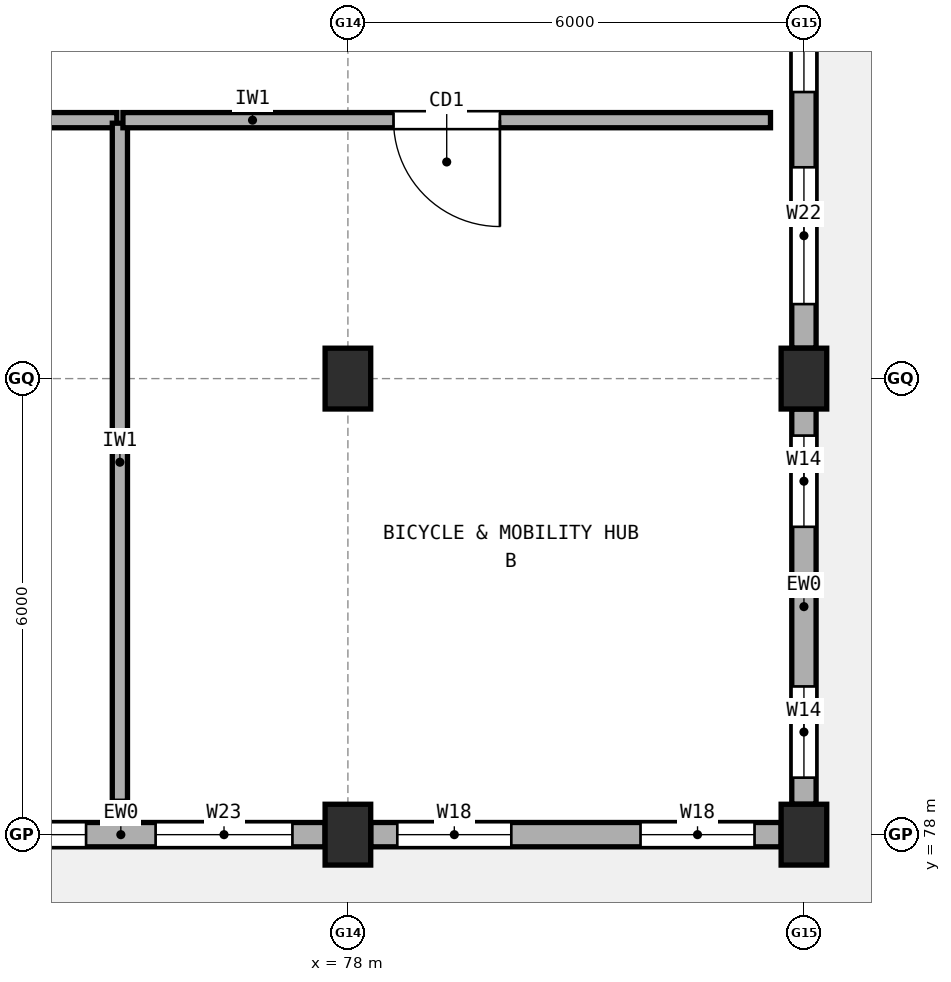
"""IFC4 building model, lengths in metres.
Left out: names, types, materials, properties, quantities, classifications, styles, units other than length and angle.
Written with IfcOpenShell. Run it as: python <this file> out.ifc"""

import sys

from ifc_helpers import new_model, si_unit, direction, frame, frame_2d, origin, origin_2d, place, context, subcontext, project, spatial, rectangle, extrude, element, fill, save


model = new_model("IFC4")
c1 = context("Model", 3, precision=1e-05, world=origin(), true_north=direction((0.0, 1.0)))
c2 = subcontext(c1, "Body", "Model", "MODEL_VIEW")
j1 = project(units=[si_unit("LENGTHUNIT", "METRE"), si_unit("PLANEANGLEUNIT", "RADIAN")], contexts=[c1])
p1 = place(None, origin())
s1 = spatial("IfcSite", under=j1, at=p1, CompositionType="ELEMENT")
p2 = place(p1, origin())
s2 = spatial("IfcBuilding", under=s1, at=p2, CompositionType="ELEMENT")
p3 = place(p2, origin())
s3 = spatial("IfcBuildingStorey", under=s2, at=p3, CompositionType="ELEMENT", Elevation=0.0)
for number, where, z_axis, x_axis in (
    (1, (78.0, 78.0, 0.0), (0.0, 0.0, 1.0), (1.0, 0.0, 0.0)),
    (2, (78.0, 84.0, 0.0), (0.0, 0.0, 1.0), (1.0, 0.0, 0.0)),
    (3, (84.0, 78.0, 0.0), (0.0, 0.0, 1.0), (1.0, 0.0, 0.0)),
    (4, (84.0, 84.0, 0.0), (0.0, 0.0, 1.0), (1.0, 0.0, 0.0)),
):
    element("IfcColumn", number, at=place(p3, frame(where, z_axis=z_axis, x_axis=x_axis)), inside=s3, PredefinedType="COLUMN", context=c2, shape_type="SweptSolid", body=[
        extrude(rectangle(XDim=0.6, YDim=0.8, at=origin_2d()), origin(), (0.0, 0.0, 1.0), 4.23),
    ])
p4 = place(p3, frame((72.35, 78.0, 0.0), z_axis=(0.0, 0.0, 1.0), x_axis=(1.0, 0.0, 0.0)))
e5 = element("IfcWall", 5, at=p4, inside=s3, PredefinedType="STANDARD", context=c2, shape_type="SweptSolid", body=[
    extrude(rectangle(XDim=5.35, YDim=0.32, at=frame_2d((2.675, 0.0))), origin(), (0.0, 0.0, 1.0), 3.112),
])
p5 = place(p4, frame((0.405, 0.0, 0.9)))
e6 = element("IfcOpeningElement", 6, at=p5, cuts=e5, PredefinedType="OPENING", context=c2, shape_type="SweptSolid", body=[
    extrude(rectangle(XDim=1.8, YDim=1.45, at=frame_2d((0.9, 0.725))), frame((0.0, 0.17, 0.0), z_axis=(0.0, -1.0, 0.0), x_axis=(1.0, 0.0, 0.0)), (0.0, 0.0, 1.0), 0.34),
])
p6 = place(p4, frame((3.12, 0.0, 0.9)))
e7 = element("IfcOpeningElement", 7, at=p6, cuts=e5, PredefinedType="OPENING", context=c2, shape_type="SweptSolid", body=[
    extrude(rectangle(XDim=1.8, YDim=1.6, at=frame_2d((0.9, 0.8))), frame((0.0, 0.17, 0.0), z_axis=(0.0, -1.0, 0.0), x_axis=(1.0, 0.0, 0.0)), (0.0, 0.0, 1.0), 0.34),
])
p7 = place(p3, frame((78.3, 78.0, 0.0), z_axis=(0.0, 0.0, 1.0), x_axis=(1.0, 0.0, 0.0)))
e8 = element("IfcWall", 8, at=p7, inside=s3, PredefinedType="STANDARD", context=c2, shape_type="SweptSolid", body=[
    extrude(rectangle(XDim=5.4, YDim=0.32, at=frame_2d((2.7, 0.0))), origin(), (0.0, 0.0, 1.0), 3.112),
])
p8 = place(p7, frame((0.35, 0.0, 0.9)))
e9 = element("IfcOpeningElement", 9, at=p8, cuts=e8, PredefinedType="OPENING", context=c2, shape_type="SweptSolid", body=[
    extrude(rectangle(XDim=1.5, YDim=1.4, at=frame_2d((0.75, 0.7))), frame((0.0, 0.17, 0.0), z_axis=(0.0, -1.0, 0.0), x_axis=(1.0, 0.0, 0.0)), (0.0, 0.0, 1.0), 0.34),
])
p9 = place(p7, frame((3.55, 0.0, 0.9)))
e10 = element("IfcOpeningElement", 10, at=p9, cuts=e8, PredefinedType="OPENING", context=c2, shape_type="SweptSolid", body=[
    extrude(rectangle(XDim=1.5, YDim=1.4, at=frame_2d((0.75, 0.7))), frame((0.0, 0.17, 0.0), z_axis=(0.0, -1.0, 0.0), x_axis=(1.0, 0.0, 0.0)), (0.0, 0.0, 1.0), 0.34),
])
p10 = place(p3, frame((84.0, 78.4, 0.0), z_axis=(0.0, 0.0, 1.0), x_axis=(0.0, 1.0, 0.0)))
e11 = element("IfcWall", 11, at=p10, inside=s3, PredefinedType="STANDARD", context=c2, shape_type="SweptSolid", body=[
    extrude(rectangle(XDim=5.2, YDim=0.32, at=frame_2d((2.6, 0.0))), origin(), (0.0, 0.0, 1.0), 3.712),
])
p11 = place(p10, frame((0.35, 0.0, 0.9)))
e12 = element("IfcOpeningElement", 12, at=p11, cuts=e11, PredefinedType="OPENING", context=c2, shape_type="SweptSolid", body=[
    extrude(rectangle(XDim=1.2, YDim=1.5, at=frame_2d((0.6, 0.75))), frame((0.0, 0.17, 0.0), z_axis=(0.0, -1.0, 0.0), x_axis=(1.0, 0.0, 0.0)), (0.0, 0.0, 1.0), 0.34),
])
p12 = place(p10, frame((3.65, 0.0, 0.9)))
e13 = element("IfcOpeningElement", 13, at=p12, cuts=e11, PredefinedType="OPENING", context=c2, shape_type="SweptSolid", body=[
    extrude(rectangle(XDim=1.2, YDim=1.5, at=frame_2d((0.6, 0.75))), frame((0.0, 0.17, 0.0), z_axis=(0.0, -1.0, 0.0), x_axis=(1.0, 0.0, 0.0)), (0.0, 0.0, 1.0), 0.34),
])
p13 = place(p3, frame((84.0, 84.4, 0.0), z_axis=(0.0, 0.0, 1.0), x_axis=(0.0, 1.0, 0.0)))
e14 = element("IfcWall", 14, at=p13, inside=s3, PredefinedType="STANDARD", context=c2, shape_type="SweptSolid", body=[
    extrude(rectangle(XDim=5.2, YDim=0.32, at=frame_2d((2.6, 0.0))), origin(), (0.0, 0.0, 1.0), 3.712),
])
p14 = place(p13, frame((0.58, 0.0, 0.9)))
e15 = element("IfcOpeningElement", 15, at=p14, cuts=e14, PredefinedType="OPENING", context=c2, shape_type="SweptSolid", body=[
    extrude(rectangle(XDim=1.8, YDim=1.45, at=frame_2d((0.9, 0.725))), frame((0.0, 0.17, 0.0), z_axis=(0.0, -1.0, 0.0), x_axis=(1.0, 0.0, 0.0)), (0.0, 0.0, 1.0), 0.34),
])
p15 = place(p13, frame((3.37, 0.0, 0.9)))
e16 = element("IfcOpeningElement", 16, at=p15, cuts=e14, PredefinedType="OPENING", context=c2, shape_type="SweptSolid", body=[
    extrude(rectangle(XDim=1.5, YDim=1.4, at=frame_2d((0.75, 0.7))), frame((0.0, 0.17, 0.0), z_axis=(0.0, -1.0, 0.0), x_axis=(1.0, 0.0, 0.0)), (0.0, 0.0, 1.0), 0.34),
])
p16 = place(p3, frame((57.04, 87.4, 0.0), z_axis=(0.0, 0.0, 1.0), x_axis=(1.0, 0.0, 0.0)))
e17 = element("IfcWall", 17, at=p16, inside=s3, PredefinedType="SOLIDWALL", context=c2, shape_type="SweptSolid", body=[
    extrude(rectangle(XDim=17.92, YDim=0.2, at=frame_2d((8.96, 0.0))), origin(), (0.0, 0.0, 1.0), 3.612),
])
p17 = place(p16, frame((8.31, 0.0, 0.0)))
e18 = element("IfcOpeningElement", 18, at=p17, cuts=e17, PredefinedType="OPENING", context=c2, shape_type="SweptSolid", body=[
    extrude(rectangle(XDim=1.3, YDim=2.15, at=frame_2d((0.65, 1.075))), frame((0.0, 0.11, 0.0), z_axis=(0.0, -1.0, 0.0), x_axis=(1.0, 0.0, 0.0)), (0.0, 0.0, 1.0), 0.22),
])
p18 = place(p3, frame((75.0, 78.44, 0.0), z_axis=(0.0, 0.0, 1.0), x_axis=(0.0, 1.0, 0.0)))
e19 = element("IfcWall", 19, at=p18, inside=s3, PredefinedType="SOLIDWALL", context=c2, shape_type="SweptSolid", body=[
    extrude(rectangle(XDim=8.92, YDim=0.2, at=frame_2d((4.46, 0.0))), origin(), (0.0, 0.0, 1.0), 3.562),
])
p19 = place(p3, frame((75.04, 87.4, 0.0), z_axis=(0.0, 0.0, 1.0), x_axis=(1.0, 0.0, 0.0)))
e20 = element("IfcWall", 20, at=p19, inside=s3, PredefinedType="SOLIDWALL", context=c2, shape_type="SweptSolid", body=[
    extrude(rectangle(XDim=8.52, YDim=0.2, at=frame_2d((4.26, 0.0))), origin(), (0.0, 0.0, 1.0), 3.712),
])
p20 = place(p19, frame((3.56, 0.0, 0.0)))
e21 = element("IfcOpeningElement", 21, at=p20, cuts=e20, PredefinedType="OPENING", context=c2, shape_type="SweptSolid", body=[
    extrude(rectangle(XDim=1.4, YDim=2.15, at=frame_2d((0.7, 1.075))), frame((0.0, 0.11, 0.0), z_axis=(0.0, -1.0, 0.0), x_axis=(1.0, 0.0, 0.0)), (0.0, 0.0, 1.0), 0.22),
])
p21 = place(p5, origin())
e22 = element("IfcWindow", 22, at=p21, inside=s3, PartitioningType="SINGLE_PANEL", PredefinedType="WINDOW", context=c2, shape_type="SweptSolid", body=[
    extrude(rectangle(XDim=1.8, YDim=1.45, at=frame_2d((0.9, 0.725))), frame((0.0, 0.03, 0.0), z_axis=(0.0, -1.0, 0.0), x_axis=(1.0, 0.0, 0.0)), (0.0, 0.0, 1.0), 0.06),
])
fill(e6, e22)
p22 = place(p6, origin())
e23 = element("IfcWindow", 23, at=p22, inside=s3, PartitioningType="SINGLE_PANEL", PredefinedType="WINDOW", context=c2, shape_type="SweptSolid", body=[
    extrude(rectangle(XDim=1.8, YDim=1.6, at=frame_2d((0.9, 0.8))), frame((0.0, 0.03, 0.0), z_axis=(0.0, -1.0, 0.0), x_axis=(1.0, 0.0, 0.0)), (0.0, 0.0, 1.0), 0.06),
])
fill(e7, e23)
p23 = place(p8, origin())
e24 = element("IfcWindow", 24, at=p23, inside=s3, PartitioningType="SINGLE_PANEL", PredefinedType="WINDOW", context=c2, shape_type="SweptSolid", body=[
    extrude(rectangle(XDim=1.5, YDim=1.4, at=frame_2d((0.75, 0.7))), frame((0.0, 0.03, 0.0), z_axis=(0.0, -1.0, 0.0), x_axis=(1.0, 0.0, 0.0)), (0.0, 0.0, 1.0), 0.06),
])
fill(e9, e24)
p24 = place(p9, origin())
e25 = element("IfcWindow", 25, at=p24, inside=s3, PartitioningType="SINGLE_PANEL", PredefinedType="WINDOW", context=c2, shape_type="SweptSolid", body=[
    extrude(rectangle(XDim=1.5, YDim=1.4, at=frame_2d((0.75, 0.7))), frame((0.0, 0.03, 0.0), z_axis=(0.0, -1.0, 0.0), x_axis=(1.0, 0.0, 0.0)), (0.0, 0.0, 1.0), 0.06),
])
fill(e10, e25)
p25 = place(p11, origin())
e26 = element("IfcWindow", 26, at=p25, inside=s3, PartitioningType="SINGLE_PANEL", PredefinedType="WINDOW", context=c2, shape_type="SweptSolid", body=[
    extrude(rectangle(XDim=1.2, YDim=1.5, at=frame_2d((0.6, 0.75))), frame((0.0, 0.03, 0.0), z_axis=(0.0, -1.0, 0.0), x_axis=(1.0, 0.0, 0.0)), (0.0, 0.0, 1.0), 0.06),
])
fill(e12, e26)
p26 = place(p12, origin())
e27 = element("IfcWindow", 27, at=p26, inside=s3, PartitioningType="SINGLE_PANEL", PredefinedType="WINDOW", context=c2, shape_type="SweptSolid", body=[
    extrude(rectangle(XDim=1.2, YDim=1.5, at=frame_2d((0.6, 0.75))), frame((0.0, 0.03, 0.0), z_axis=(0.0, -1.0, 0.0), x_axis=(1.0, 0.0, 0.0)), (0.0, 0.0, 1.0), 0.06),
])
fill(e13, e27)
p27 = place(p14, origin())
e28 = element("IfcWindow", 28, at=p27, inside=s3, PartitioningType="SINGLE_PANEL", PredefinedType="WINDOW", context=c2, shape_type="SweptSolid", body=[
    extrude(rectangle(XDim=1.8, YDim=1.45, at=frame_2d((0.9, 0.725))), frame((0.0, 0.03, 0.0), z_axis=(0.0, -1.0, 0.0), x_axis=(1.0, 0.0, 0.0)), (0.0, 0.0, 1.0), 0.06),
])
fill(e15, e28)
p28 = place(p15, origin())
e29 = element("IfcWindow", 29, at=p28, inside=s3, PartitioningType="SINGLE_PANEL", PredefinedType="WINDOW", context=c2, shape_type="SweptSolid", body=[
    extrude(rectangle(XDim=1.5, YDim=1.4, at=frame_2d((0.75, 0.7))), frame((0.0, 0.03, 0.0), z_axis=(0.0, -1.0, 0.0), x_axis=(1.0, 0.0, 0.0)), (0.0, 0.0, 1.0), 0.06),
])
fill(e16, e29)
p29 = place(p20, origin())
e30 = element("IfcDoor", 30, at=p29, inside=s3, OperationType="SINGLE_SWING_RIGHT", PredefinedType="DOOR", context=c2, shape_type="SweptSolid", body=[
    extrude(rectangle(XDim=1.4, YDim=2.15, at=frame_2d((0.7, 1.075))), frame((0.0, 0.025, 0.0), z_axis=(0.0, -1.0, 0.0), x_axis=(1.0, 0.0, 0.0)), (0.0, 0.0, 1.0), 0.05),
])
fill(e21, e30)
save(model, sys.argv[1])
